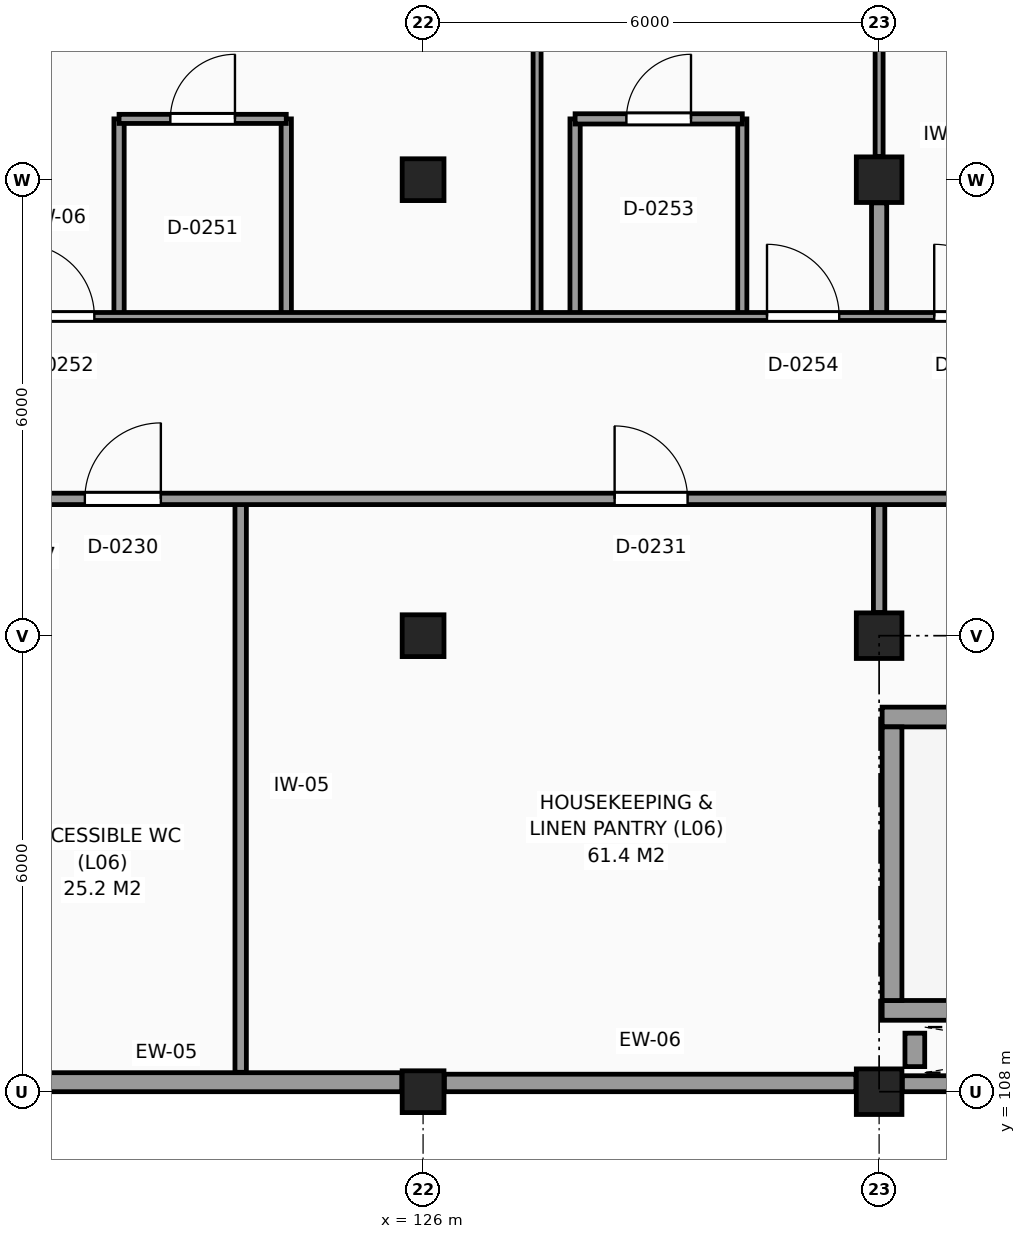
"""IFC4 building model, lengths in metres.
Left out: names, types, materials, properties, quantities, classifications, styles, units other than length and angle.
Written with IfcOpenShell. Run it as: python <this file> out.ifc"""

import sys

from ifc_helpers import new_model, si_unit, direction, frame, frame_2d, origin, origin_2d, place, context, subcontext, project, spatial, rectangle, extrude, element, fill, save


model = new_model("IFC4")
c1 = context("Model", 3, precision=1e-05, world=origin(), true_north=direction((0.0, 1.0)))
c2 = subcontext(c1, "Body", "Model", "MODEL_VIEW")
j1 = project(units=[si_unit("LENGTHUNIT", "METRE"), si_unit("PLANEANGLEUNIT", "RADIAN")], contexts=[c1])
p1 = place(None, origin())
s1 = spatial("IfcSite", under=j1, at=p1, CompositionType="ELEMENT")
p2 = place(p1, origin())
s2 = spatial("IfcBuilding", under=s1, at=p2, CompositionType="ELEMENT")
p3 = place(p2, frame((0.0, 0.0, 28.2)))
s3 = spatial("IfcBuildingStorey", under=s2, at=p3, CompositionType="ELEMENT", Elevation=28.2)
for number, where, z_axis, x_axis in (
    (1, (126.0, 108.0, 0.0), (0.0, 0.0, 1.0), (1.0, 0.0, 0.0)),
    (2, (126.0, 114.0, 0.0), (0.0, 0.0, 1.0), (1.0, 0.0, 0.0)),
    (3, (126.0, 120.0, 0.0), (0.0, 0.0, 1.0), (1.0, 0.0, 0.0)),
):
    element("IfcColumn", number, at=place(p3, frame(where, z_axis=z_axis, x_axis=x_axis)), inside=s3, PredefinedType="COLUMN", context=c2, shape_type="SweptSolid", body=[
        extrude(rectangle(XDim=0.55, YDim=0.55, at=origin_2d()), origin(), (0.0, 0.0, 1.0), 3.3),
    ])
for number, where, z_axis, x_axis in (
    (4, (132.0, 108.0, 0.0), (0.0, 0.0, 1.0), (1.0, 0.0, 0.0)),
    (5, (132.0, 114.0, 0.0), (0.0, 0.0, 1.0), (1.0, 0.0, 0.0)),
    (6, (132.0, 120.0, 0.0), (0.0, 0.0, 1.0), (1.0, 0.0, 0.0)),
):
    element("IfcColumn", number, at=place(p3, frame(where, z_axis=z_axis, x_axis=x_axis)), inside=s3, PredefinedType="COLUMN", context=c2, shape_type="SweptSolid", body=[
        extrude(rectangle(XDim=0.6, YDim=0.6, at=origin_2d()), origin(), (0.0, 0.0, 1.0), 3.3),
    ])
p4 = place(p3, frame((120.305, 108.125, 0.0), z_axis=(0.0, 0.0, 1.0), x_axis=(1.0, 0.0, 0.0)))
e7 = element("IfcWall", 7, at=p4, inside=s3, PredefinedType="SOLIDWALL", context=c2, shape_type="SweptSolid", body=[
    extrude(rectangle(XDim=5.415, YDim=0.25, at=frame_2d((2.708, 0.0))), origin(), (0.0, 0.0, 1.0), 2.43),
])
p5 = place(p3, frame((126.28, 108.115, 0.0), z_axis=(0.0, 0.0, 1.0), x_axis=(1.0, 0.0, 0.0)))
e8 = element("IfcWall", 8, at=p5, inside=s3, PredefinedType="SOLIDWALL", context=c2, shape_type="SweptSolid", body=[
    extrude(rectangle(XDim=5.415, YDim=0.23, at=frame_2d((2.708, 0.0))), origin(), (0.0, 0.0, 1.0), 2.43),
])
p6 = place(p3, frame((132.305, 108.105, 0.0), z_axis=(0.0, 0.0, 1.0), x_axis=(1.0, 0.0, 0.0)))
e9 = element("IfcWall", 9, at=p6, inside=s3, PredefinedType="SOLIDWALL", context=c2, shape_type="SweptSolid", body=[
    extrude(rectangle(XDim=5.415, YDim=0.21, at=frame_2d((2.708, 0.0))), origin(), (0.0, 0.0, 1.0), 3.08),
])
for number, where, z_axis, x_axis in (
    (10, (132.04, 109.07, 0.0), (0.0, 0.0, 1.0), (1.0, 0.0, 0.0)),
    (11, (132.04, 112.93, 0.0), (0.0, 0.0, 1.0), (1.0, 0.0, 0.0)),
):
    element("IfcWall", number, at=place(p3, frame(where, z_axis=z_axis, x_axis=x_axis)), inside=s3, PredefinedType="SHEAR", context=c2, shape_type="SweptSolid", body=[
        extrude(rectangle(XDim=10.72, YDim=0.26, at=frame_2d((5.36, 0.0))), origin(), (0.0, 0.0, 1.0), 3.3),
    ])
p7 = place(p3, frame((132.17, 109.2, 0.0), z_axis=(0.0, 0.0, 1.0), x_axis=(0.0, 1.0, 0.0)))
e12 = element("IfcWall", 12, at=p7, inside=s3, PredefinedType="SHEAR", context=c2, shape_type="SweptSolid", body=[
    extrude(rectangle(XDim=3.6, YDim=0.26, at=frame_2d((1.8, 0.0))), origin(), (0.0, 0.0, 1.0), 3.3),
])
p8 = place(p3, frame((132.47, 108.33, 0.0), z_axis=(0.0, 0.0, 1.0), x_axis=(0.0, 1.0, 0.0)))
e13 = element("IfcWall", 13, at=p8, inside=s3, PredefinedType="SHEAR", context=c2, shape_type="SweptSolid", body=[
    extrude(rectangle(XDim=0.44, YDim=0.26, at=frame_2d((0.22, 0.0))), origin(), (0.0, 0.0, 1.0), 3.3),
])
p9 = place(p3, frame((122.0, 118.2, 0.0), z_axis=(0.0, 0.0, 1.0), x_axis=(0.0, 1.0, 0.0)))
e14 = element("IfcWall", 14, at=p9, inside=s3, PredefinedType="PARTITIONING", context=c2, shape_type="SweptSolid", body=[
    extrude(rectangle(XDim=2.6, YDim=0.135, at=frame_2d((1.3, 0.0))), origin(), (0.0, 0.0, 1.0), 3.08),
])
p10 = place(p3, frame((123.6, 108.255, 0.0), z_axis=(0.0, 0.0, 1.0), x_axis=(0.0, 1.0, 0.0)))
e15 = element("IfcWall", 15, at=p10, inside=s3, PredefinedType="PARTITIONING", context=c2, shape_type="SweptSolid", body=[
    extrude(rectangle(XDim=7.545, YDim=0.15, at=frame_2d((3.772, 0.0))), origin(), (0.0, 0.0, 1.0), 3.08),
])
p11 = place(p3, frame((124.2, 118.2, 0.0), z_axis=(0.0, 0.0, 1.0), x_axis=(0.0, 1.0, 0.0)))
e16 = element("IfcWall", 16, at=p11, inside=s3, PredefinedType="PARTITIONING", context=c2, shape_type="SweptSolid", body=[
    extrude(rectangle(XDim=2.6, YDim=0.135, at=frame_2d((1.3, 0.0))), origin(), (0.0, 0.0, 1.0), 3.08),
])
p12 = place(p3, frame((127.5, 118.2, 0.0), z_axis=(0.0, 0.0, 1.0), x_axis=(0.0, 1.0, 0.0)))
e17 = element("IfcWall", 17, at=p12, inside=s3, PredefinedType="PARTITIONING", context=c2, shape_type="SweptSolid", body=[
    extrude(rectangle(XDim=7.565, YDim=0.105, at=frame_2d((3.782, 0.0))), origin(), (0.0, 0.0, 1.0), 3.08),
])
p13 = place(p3, frame((128.0, 118.2, 0.0), z_axis=(0.0, 0.0, 1.0), x_axis=(0.0, 1.0, 0.0)))
e18 = element("IfcWall", 18, at=p13, inside=s3, PredefinedType="PARTITIONING", context=c2, shape_type="SweptSolid", body=[
    extrude(rectangle(XDim=2.6, YDim=0.135, at=frame_2d((1.3, 0.0))), origin(), (0.0, 0.0, 1.0), 3.08),
])
p14 = place(p3, frame((130.2, 118.2, 0.0), z_axis=(0.0, 0.0, 1.0), x_axis=(0.0, 1.0, 0.0)))
e19 = element("IfcWall", 19, at=p14, inside=s3, PredefinedType="PARTITIONING", context=c2, shape_type="SweptSolid", body=[
    extrude(rectangle(XDim=2.6, YDim=0.12, at=frame_2d((1.3, 0.0))), origin(), (0.0, 0.0, 1.0), 3.08),
])
p15 = place(p3, frame((132.0, 114.305, 0.0), z_axis=(0.0, 0.0, 1.0), x_axis=(0.0, 1.0, 0.0)))
e20 = element("IfcWall", 20, at=p15, inside=s3, PredefinedType="PARTITIONING", context=c2, shape_type="SweptSolid", body=[
    extrude(rectangle(XDim=1.495, YDim=0.15, at=frame_2d((0.748, 0.0))), origin(), (0.0, 0.0, 1.0), 2.28),
])
p16 = place(p3, frame((132.0, 118.2, 0.0), z_axis=(0.0, 0.0, 1.0), x_axis=(0.0, 1.0, 0.0)))
e21 = element("IfcWall", 21, at=p16, inside=s3, PredefinedType="PARTITIONING", context=c2, shape_type="SweptSolid", body=[
    extrude(rectangle(XDim=1.495, YDim=0.2, at=frame_2d((0.748, 0.0))), origin(), (0.0, 0.0, 1.0), 2.28),
])
p17 = place(p3, frame((132.0, 120.305, 0.0), z_axis=(0.0, 0.0, 1.0), x_axis=(0.0, 1.0, 0.0)))
e22 = element("IfcWall", 22, at=p17, inside=s3, PredefinedType="PARTITIONING", context=c2, shape_type="SweptSolid", body=[
    extrude(rectangle(XDim=5.39, YDim=0.105, at=frame_2d((2.695, 0.0))), origin(), (0.0, 0.0, 1.0), 2.28),
])
p18 = place(p3, frame((66.235, 115.8, 0.0), z_axis=(0.0, 0.0, 1.0), x_axis=(1.0, 0.0, 0.0)))
e23 = element("IfcWall", 23, at=p18, inside=s3, PredefinedType="PARTITIONING", context=c2, shape_type="SweptSolid", body=[
    extrude(rectangle(XDim=103.565, YDim=0.15, at=frame_2d((51.782, 0.0))), origin(), (0.0, 0.0, 1.0), 3.08),
])
p19 = place(p18, frame((80.165, 0.0, 0.0)))
e24 = element("IfcOpeningElement", 24, at=p19, cuts=e23, PredefinedType="OPENING", context=c2, shape_type="SweptSolid", body=[
    extrude(rectangle(XDim=1.2, YDim=2.2, at=frame_2d((0.6, 1.1))), frame((0.0, 0.085, 0.0), z_axis=(0.0, -1.0, 0.0), x_axis=(1.0, 0.0, 0.0)), (0.0, 0.0, 1.0), 0.17),
])
p20 = place(p18, frame((50.165, 0.0, 0.0)))
e25 = element("IfcOpeningElement", 25, at=p20, cuts=e23, PredefinedType="OPENING", context=c2, shape_type="SweptSolid", body=[
    extrude(rectangle(XDim=1.2, YDim=2.2, at=frame_2d((0.6, 1.1))), frame((0.0, 0.085, 0.0), z_axis=(0.0, -1.0, 0.0), x_axis=(1.0, 0.0, 0.0)), (0.0, 0.0, 1.0), 0.17),
])
p21 = place(p18, frame((9.015, 0.0, 0.0)))
e26 = element("IfcOpeningElement", 26, at=p21, cuts=e23, PredefinedType="OPENING", context=c2, shape_type="SweptSolid", body=[
    extrude(rectangle(XDim=1.1, YDim=2.15, at=frame_2d((0.55, 1.075))), frame((0.0, 0.085, 0.0), z_axis=(0.0, -1.0, 0.0), x_axis=(1.0, 0.0, 0.0)), (0.0, 0.0, 1.0), 0.17),
])
p22 = place(p18, frame((55.315, 0.0, 0.0)))
e27 = element("IfcOpeningElement", 27, at=p22, cuts=e23, PredefinedType="OPENING", context=c2, shape_type="SweptSolid", body=[
    extrude(rectangle(XDim=1.0, YDim=2.15, at=frame_2d((0.5, 1.075))), frame((0.0, 0.085, 0.0), z_axis=(0.0, -1.0, 0.0), x_axis=(1.0, 0.0, 0.0)), (0.0, 0.0, 1.0), 0.17),
])
p23 = place(p18, frame((62.285, 0.0, 0.0)))
e28 = element("IfcOpeningElement", 28, at=p23, cuts=e23, PredefinedType="OPENING", context=c2, shape_type="SweptSolid", body=[
    extrude(rectangle(XDim=0.96, YDim=2.15, at=frame_2d((0.48, 1.075))), frame((0.0, 0.085, 0.0), z_axis=(0.0, -1.0, 0.0), x_axis=(1.0, 0.0, 0.0)), (0.0, 0.0, 1.0), 0.17),
])
p24 = place(p18, frame((31.965, 0.0, 0.0)))
e29 = element("IfcOpeningElement", 29, at=p24, cuts=e23, PredefinedType="OPENING", context=c2, shape_type="SweptSolid", body=[
    extrude(rectangle(XDim=1.6, YDim=2.25, at=frame_2d((0.8, 1.125))), frame((0.0, 0.085, 0.0), z_axis=(0.0, -1.0, 0.0), x_axis=(1.0, 0.0, 0.0)), (0.0, 0.0, 1.0), 0.17),
])
p25 = place(p18, frame((18.59, 0.0, 0.0)))
e30 = element("IfcOpeningElement", 30, at=p25, cuts=e23, PredefinedType="OPENING", context=c2, shape_type="SweptSolid", body=[
    extrude(rectangle(XDim=0.95, YDim=2.1, at=frame_2d((0.475, 1.05))), frame((0.0, 0.085, 0.0), z_axis=(0.0, -1.0, 0.0), x_axis=(1.0, 0.0, 0.0)), (0.0, 0.0, 1.0), 0.17),
])
p26 = place(p18, frame((24.59, 0.0, 0.0)))
e31 = element("IfcOpeningElement", 31, at=p26, cuts=e23, PredefinedType="OPENING", context=c2, shape_type="SweptSolid", body=[
    extrude(rectangle(XDim=0.95, YDim=2.1, at=frame_2d((0.475, 1.05))), frame((0.0, 0.085, 0.0), z_axis=(0.0, -1.0, 0.0), x_axis=(1.0, 0.0, 0.0)), (0.0, 0.0, 1.0), 0.17),
])
p27 = place(p18, frame((84.49, 0.0, 0.0)))
e32 = element("IfcOpeningElement", 32, at=p27, cuts=e23, PredefinedType="OPENING", context=c2, shape_type="SweptSolid", body=[
    extrude(rectangle(XDim=0.95, YDim=2.1, at=frame_2d((0.475, 1.05))), frame((0.0, 0.085, 0.0), z_axis=(0.0, -1.0, 0.0), x_axis=(1.0, 0.0, 0.0)), (0.0, 0.0, 1.0), 0.17),
])
p28 = place(p3, frame((66.235, 118.2, 0.0), z_axis=(0.0, 0.0, 1.0), x_axis=(1.0, 0.0, 0.0)))
e33 = element("IfcWall", 33, at=p28, inside=s3, PredefinedType="PARTITIONING", context=c2, shape_type="SweptSolid", body=[
    extrude(rectangle(XDim=110.265, YDim=0.105, at=frame_2d((55.132, 0.0))), origin(), (0.0, 0.0, 1.0), 3.08),
])
p29 = place(p28, frame((0.49, 0.0, 0.0)))
e34 = element("IfcOpeningElement", 34, at=p29, cuts=e33, PredefinedType="OPENING", context=c2, shape_type="SweptSolid", body=[
    extrude(rectangle(XDim=0.95, YDim=2.1, at=frame_2d((0.475, 1.05))), frame((0.0, 0.062, 0.0), z_axis=(0.0, -1.0, 0.0), x_axis=(1.0, 0.0, 0.0)), (0.0, 0.0, 1.0), 0.125),
])
p30 = place(p28, frame((4.89, 0.0, 0.0)))
e35 = element("IfcOpeningElement", 35, at=p30, cuts=e33, PredefinedType="OPENING", context=c2, shape_type="SweptSolid", body=[
    extrude(rectangle(XDim=0.95, YDim=2.1, at=frame_2d((0.475, 1.05))), frame((0.0, 0.062, 0.0), z_axis=(0.0, -1.0, 0.0), x_axis=(1.0, 0.0, 0.0)), (0.0, 0.0, 1.0), 0.125),
])
p31 = place(p28, frame((9.39, 0.0, 0.0)))
e36 = element("IfcOpeningElement", 36, at=p31, cuts=e33, PredefinedType="OPENING", context=c2, shape_type="SweptSolid", body=[
    extrude(rectangle(XDim=0.95, YDim=2.1, at=frame_2d((0.475, 1.05))), frame((0.0, 0.062, 0.0), z_axis=(0.0, -1.0, 0.0), x_axis=(1.0, 0.0, 0.0)), (0.0, 0.0, 1.0), 0.125),
])
p32 = place(p28, frame((24.09, 0.0, 0.0)))
e37 = element("IfcOpeningElement", 37, at=p32, cuts=e33, PredefinedType="OPENING", context=c2, shape_type="SweptSolid", body=[
    extrude(rectangle(XDim=0.95, YDim=2.1, at=frame_2d((0.475, 1.05))), frame((0.0, 0.062, 0.0), z_axis=(0.0, -1.0, 0.0), x_axis=(1.0, 0.0, 0.0)), (0.0, 0.0, 1.0), 0.125),
])
p33 = place(p28, frame((32.34, 0.0, 0.0)))
e38 = element("IfcOpeningElement", 38, at=p33, cuts=e33, PredefinedType="OPENING", context=c2, shape_type="SweptSolid", body=[
    extrude(rectangle(XDim=0.95, YDim=2.1, at=frame_2d((0.475, 1.05))), frame((0.0, 0.062, 0.0), z_axis=(0.0, -1.0, 0.0), x_axis=(1.0, 0.0, 0.0)), (0.0, 0.0, 1.0), 0.125),
])
p34 = place(p28, frame((34.89, 0.0, 0.0)))
e39 = element("IfcOpeningElement", 39, at=p34, cuts=e33, PredefinedType="OPENING", context=c2, shape_type="SweptSolid", body=[
    extrude(rectangle(XDim=0.95, YDim=2.1, at=frame_2d((0.475, 1.05))), frame((0.0, 0.062, 0.0), z_axis=(0.0, -1.0, 0.0), x_axis=(1.0, 0.0, 0.0)), (0.0, 0.0, 1.0), 0.125),
])
p35 = place(p28, frame((42.09, 0.0, 0.0)))
e40 = element("IfcOpeningElement", 40, at=p35, cuts=e33, PredefinedType="OPENING", context=c2, shape_type="SweptSolid", body=[
    extrude(rectangle(XDim=0.95, YDim=2.1, at=frame_2d((0.475, 1.05))), frame((0.0, 0.062, 0.0), z_axis=(0.0, -1.0, 0.0), x_axis=(1.0, 0.0, 0.0)), (0.0, 0.0, 1.0), 0.125),
])
p36 = place(p28, frame((46.29, 0.0, 0.0)))
e41 = element("IfcOpeningElement", 41, at=p36, cuts=e33, PredefinedType="OPENING", context=c2, shape_type="SweptSolid", body=[
    extrude(rectangle(XDim=0.95, YDim=2.1, at=frame_2d((0.475, 1.05))), frame((0.0, 0.062, 0.0), z_axis=(0.0, -1.0, 0.0), x_axis=(1.0, 0.0, 0.0)), (0.0, 0.0, 1.0), 0.125),
])
p37 = place(p28, frame((48.49, 0.0, 0.0)))
e42 = element("IfcOpeningElement", 42, at=p37, cuts=e33, PredefinedType="OPENING", context=c2, shape_type="SweptSolid", body=[
    extrude(rectangle(XDim=0.95, YDim=2.1, at=frame_2d((0.475, 1.05))), frame((0.0, 0.062, 0.0), z_axis=(0.0, -1.0, 0.0), x_axis=(1.0, 0.0, 0.0)), (0.0, 0.0, 1.0), 0.125),
])
p38 = place(p28, frame((54.49, 0.0, 0.0)))
e43 = element("IfcOpeningElement", 43, at=p38, cuts=e33, PredefinedType="OPENING", context=c2, shape_type="SweptSolid", body=[
    extrude(rectangle(XDim=0.95, YDim=2.1, at=frame_2d((0.475, 1.05))), frame((0.0, 0.062, 0.0), z_axis=(0.0, -1.0, 0.0), x_axis=(1.0, 0.0, 0.0)), (0.0, 0.0, 1.0), 0.125),
])
p39 = place(p28, frame((64.29, 0.0, 0.0)))
e44 = element("IfcOpeningElement", 44, at=p39, cuts=e33, PredefinedType="OPENING", context=c2, shape_type="SweptSolid", body=[
    extrude(rectangle(XDim=0.95, YDim=2.1, at=frame_2d((0.475, 1.05))), frame((0.0, 0.062, 0.0), z_axis=(0.0, -1.0, 0.0), x_axis=(1.0, 0.0, 0.0)), (0.0, 0.0, 1.0), 0.125),
])
p40 = place(p28, frame((66.49, 0.0, 0.0)))
e45 = element("IfcOpeningElement", 45, at=p40, cuts=e33, PredefinedType="OPENING", context=c2, shape_type="SweptSolid", body=[
    extrude(rectangle(XDim=0.95, YDim=2.1, at=frame_2d((0.475, 1.05))), frame((0.0, 0.062, 0.0), z_axis=(0.0, -1.0, 0.0), x_axis=(1.0, 0.0, 0.0)), (0.0, 0.0, 1.0), 0.125),
])
p41 = place(p28, frame((70.89, 0.0, 0.0)))
e46 = element("IfcOpeningElement", 46, at=p41, cuts=e33, PredefinedType="OPENING", context=c2, shape_type="SweptSolid", body=[
    extrude(rectangle(XDim=0.95, YDim=2.1, at=frame_2d((0.475, 1.05))), frame((0.0, 0.062, 0.0), z_axis=(0.0, -1.0, 0.0), x_axis=(1.0, 0.0, 0.0)), (0.0, 0.0, 1.0), 0.125),
])
p42 = place(p28, frame((78.09, 0.0, 0.0)))
e47 = element("IfcOpeningElement", 47, at=p42, cuts=e33, PredefinedType="OPENING", context=c2, shape_type="SweptSolid", body=[
    extrude(rectangle(XDim=0.95, YDim=2.1, at=frame_2d((0.475, 1.05))), frame((0.0, 0.062, 0.0), z_axis=(0.0, -1.0, 0.0), x_axis=(1.0, 0.0, 0.0)), (0.0, 0.0, 1.0), 0.125),
])
p43 = place(p28, frame((86.34, 0.0, 0.0)))
e48 = element("IfcOpeningElement", 48, at=p43, cuts=e33, PredefinedType="OPENING", context=c2, shape_type="SweptSolid", body=[
    extrude(rectangle(XDim=0.95, YDim=2.1, at=frame_2d((0.475, 1.05))), frame((0.0, 0.062, 0.0), z_axis=(0.0, -1.0, 0.0), x_axis=(1.0, 0.0, 0.0)), (0.0, 0.0, 1.0), 0.125),
])
p44 = place(p28, frame((88.89, 0.0, 0.0)))
e49 = element("IfcOpeningElement", 49, at=p44, cuts=e33, PredefinedType="OPENING", context=c2, shape_type="SweptSolid", body=[
    extrude(rectangle(XDim=0.95, YDim=2.1, at=frame_2d((0.475, 1.05))), frame((0.0, 0.062, 0.0), z_axis=(0.0, -1.0, 0.0), x_axis=(1.0, 0.0, 0.0)), (0.0, 0.0, 1.0), 0.125),
])
p45 = place(p28, frame((93.39, 0.0, 0.0)))
e50 = element("IfcOpeningElement", 50, at=p45, cuts=e33, PredefinedType="OPENING", context=c2, shape_type="SweptSolid", body=[
    extrude(rectangle(XDim=0.95, YDim=2.1, at=frame_2d((0.475, 1.05))), frame((0.0, 0.062, 0.0), z_axis=(0.0, -1.0, 0.0), x_axis=(1.0, 0.0, 0.0)), (0.0, 0.0, 1.0), 0.125),
])
p46 = place(p28, frame((104.99, 0.0, 0.0)))
e51 = element("IfcOpeningElement", 51, at=p46, cuts=e33, PredefinedType="OPENING", context=c2, shape_type="SweptSolid", body=[
    extrude(rectangle(XDim=0.95, YDim=2.1, at=frame_2d((0.475, 1.05))), frame((0.0, 0.062, 0.0), z_axis=(0.0, -1.0, 0.0), x_axis=(1.0, 0.0, 0.0)), (0.0, 0.0, 1.0), 0.125),
])
p47 = place(p3, frame((122.0, 120.8, 0.0), z_axis=(0.0, 0.0, 1.0), x_axis=(1.0, 0.0, 0.0)))
e52 = element("IfcWall", 52, at=p47, inside=s3, PredefinedType="PARTITIONING", context=c2, shape_type="SweptSolid", body=[
    extrude(rectangle(XDim=2.2, YDim=0.12, at=frame_2d((1.1, 0.0))), origin(), (0.0, 0.0, 1.0), 3.08),
])
p48 = place(p47, frame((0.675, 0.0, 0.0)))
e53 = element("IfcOpeningElement", 53, at=p48, cuts=e52, PredefinedType="OPENING", context=c2, shape_type="SweptSolid", body=[
    extrude(rectangle(XDim=0.85, YDim=2.1, at=frame_2d((0.425, 1.05))), frame((0.0, 0.07, 0.0), z_axis=(0.0, -1.0, 0.0), x_axis=(1.0, 0.0, 0.0)), (0.0, 0.0, 1.0), 0.14),
])
p49 = place(p3, frame((128.0, 120.8, 0.0), z_axis=(0.0, 0.0, 1.0), x_axis=(1.0, 0.0, 0.0)))
e54 = element("IfcWall", 54, at=p49, inside=s3, PredefinedType="PARTITIONING", context=c2, shape_type="SweptSolid", body=[
    extrude(rectangle(XDim=2.2, YDim=0.135, at=frame_2d((1.1, 0.0))), origin(), (0.0, 0.0, 1.0), 3.08),
])
p50 = place(p49, frame((0.675, 0.0, 0.0)))
e55 = element("IfcOpeningElement", 55, at=p50, cuts=e54, PredefinedType="OPENING", context=c2, shape_type="SweptSolid", body=[
    extrude(rectangle(XDim=0.85, YDim=2.1, at=frame_2d((0.425, 1.05))), frame((0.0, 0.078, 0.0), z_axis=(0.0, -1.0, 0.0), x_axis=(1.0, 0.0, 0.0)), (0.0, 0.0, 1.0), 0.155),
])
p51 = place(p22, origin())
e56 = element("IfcDoor", 56, at=p51, inside=s3, OperationType="SINGLE_SWING_RIGHT", PredefinedType="DOOR", context=c2, shape_type="SweptSolid", body=[
    extrude(rectangle(XDim=1.0, YDim=2.15, at=frame_2d((0.5, 1.075))), frame((0.0, 0.025, 0.0), z_axis=(0.0, -1.0, 0.0), x_axis=(1.0, 0.0, 0.0)), (0.0, 0.0, 1.0), 0.05),
])
fill(e27, e56)
p52 = place(p23, origin())
e57 = element("IfcDoor", 57, at=p52, inside=s3, OperationType="SINGLE_SWING_LEFT", PredefinedType="DOOR", context=c2, shape_type="SweptSolid", body=[
    extrude(rectangle(XDim=0.96, YDim=2.15, at=frame_2d((0.48, 1.075))), frame((0.0, 0.025, 0.0), z_axis=(0.0, -1.0, 0.0), x_axis=(1.0, 0.0, 0.0)), (0.0, 0.0, 1.0), 0.05),
])
fill(e28, e57)
p53 = place(p48, origin())
e58 = element("IfcDoor", 58, at=p53, inside=s3, OperationType="SINGLE_SWING_RIGHT", PredefinedType="DOOR", context=c2, shape_type="SweptSolid", body=[
    extrude(rectangle(XDim=0.85, YDim=2.1, at=frame_2d((0.425, 1.05))), frame((0.0, 0.025, 0.0), z_axis=(0.0, -1.0, 0.0), x_axis=(1.0, 0.0, 0.0)), (0.0, 0.0, 1.0), 0.05),
])
fill(e53, e58)
p54 = place(p38, origin())
e59 = element("IfcDoor", 59, at=p54, inside=s3, OperationType="SINGLE_SWING_LEFT", PredefinedType="DOOR", context=c2, shape_type="SweptSolid", body=[
    extrude(rectangle(XDim=0.95, YDim=2.1, at=frame_2d((0.475, 1.05))), frame((0.0, 0.025, 0.0), z_axis=(0.0, -1.0, 0.0), x_axis=(1.0, 0.0, 0.0)), (0.0, 0.0, 1.0), 0.05),
])
fill(e43, e59)
p55 = place(p50, origin())
e60 = element("IfcDoor", 60, at=p55, inside=s3, OperationType="SINGLE_SWING_RIGHT", PredefinedType="DOOR", context=c2, shape_type="SweptSolid", body=[
    extrude(rectangle(XDim=0.85, YDim=2.1, at=frame_2d((0.425, 1.05))), frame((0.0, 0.025, 0.0), z_axis=(0.0, -1.0, 0.0), x_axis=(1.0, 0.0, 0.0)), (0.0, 0.0, 1.0), 0.05),
])
fill(e55, e60)
p56 = place(p39, origin())
e61 = element("IfcDoor", 61, at=p56, inside=s3, OperationType="SINGLE_SWING_LEFT", PredefinedType="DOOR", context=c2, shape_type="SweptSolid", body=[
    extrude(rectangle(XDim=0.95, YDim=2.1, at=frame_2d((0.475, 1.05))), frame((0.0, 0.025, 0.0), z_axis=(0.0, -1.0, 0.0), x_axis=(1.0, 0.0, 0.0)), (0.0, 0.0, 1.0), 0.05),
])
fill(e44, e61)
p57 = place(p40, origin())
e62 = element("IfcDoor", 62, at=p57, inside=s3, OperationType="SINGLE_SWING_LEFT", PredefinedType="DOOR", context=c2, shape_type="SweptSolid", body=[
    extrude(rectangle(XDim=0.95, YDim=2.1, at=frame_2d((0.475, 1.05))), frame((0.0, 0.025, 0.0), z_axis=(0.0, -1.0, 0.0), x_axis=(1.0, 0.0, 0.0)), (0.0, 0.0, 1.0), 0.05),
])
fill(e45, e62)
save(model, sys.argv[1])
